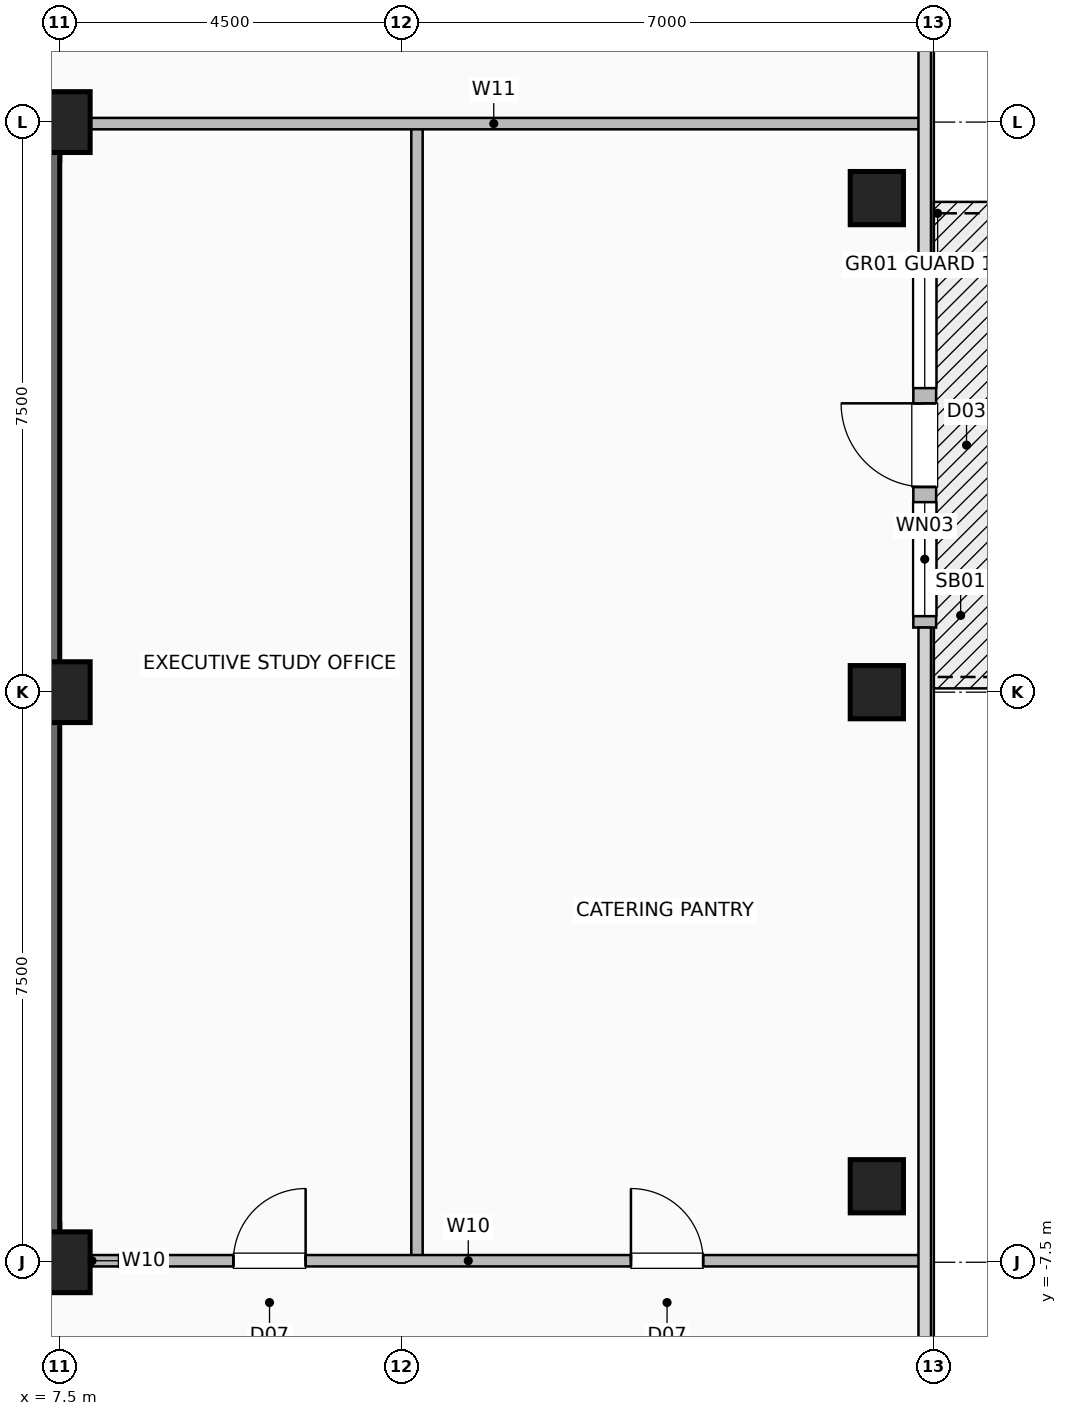
"""IFC4 building model, lengths in metres.
Left out: names, types, materials, properties, quantities, classifications, styles, units other than length and angle.
Written with IfcOpenShell. Run it as: python <this file> out.ifc"""

import sys

from ifc_helpers import new_model, si_unit, direction, frame, frame_2d, origin, origin_2d, place, context, subcontext, project, spatial, rectangle, hollow_rectangle, extrude, element, fill, save


model = new_model("IFC4")
c1 = context("Model", 3, precision=1e-05, world=origin(), true_north=direction((0.0, 1.0)))
c2 = subcontext(c1, "Body", "Model", "MODEL_VIEW")
j1 = project(units=[si_unit("LENGTHUNIT", "METRE"), si_unit("PLANEANGLEUNIT", "RADIAN")], contexts=[c1])
p1 = place(None, origin())
s1 = spatial("IfcSite", under=j1, at=p1, CompositionType="ELEMENT")
p2 = place(p1, origin())
s2 = spatial("IfcBuilding", under=s1, at=p2, CompositionType="ELEMENT")
p3 = place(p2, frame((0.0, 0.0, 243.2)))
s3 = spatial("IfcBuildingStorey", under=s2, at=p3, CompositionType="ELEMENT", Elevation=243.2)
for number, where, z_axis, x_axis in (
    (1, (7.5, -7.5, 0.0), (0.0, 0.0, 1.0), (1.0, 0.0, 0.0)),
    (2, (7.5, 0.0, 0.0), (0.0, 0.0, 1.0), (1.0, 0.0, 0.0)),
    (3, (7.5, 7.5, 0.0), (0.0, 0.0, 1.0), (1.0, 0.0, 0.0)),
):
    element("IfcColumn", number, at=place(p3, frame(where, z_axis=z_axis, x_axis=x_axis)), inside=s3, PredefinedType="COLUMN", context=c2, shape_type="SweptSolid", body=[
        extrude(hollow_rectangle(XDim=0.8, YDim=0.8, WallThickness=0.04, at=origin_2d()), origin(), (0.0, 0.0, 1.0), 3.6),
    ])
for number, where, z_axis, x_axis in (
    (4, (18.25, -6.5, 0.0), (0.0, 0.0, 1.0), (1.0, 0.0, 0.0)),
    (5, (18.25, 0.0, 0.0), (0.0, 0.0, 1.0), (1.0, 0.0, 0.0)),
    (6, (18.25, 6.5, 0.0), (0.0, 0.0, 1.0), (1.0, 0.0, 0.0)),
):
    element("IfcColumn", number, at=place(p3, frame(where, z_axis=z_axis, x_axis=x_axis)), inside=s3, PredefinedType="COLUMN", context=c2, shape_type="SweptSolid", body=[
        extrude(hollow_rectangle(XDim=0.7, YDim=0.7, WallThickness=0.035, at=origin_2d()), origin(), (0.0, 0.0, 1.0), 3.6),
    ])
p4 = place(p3, frame((18.88, 0.85, 0.0), z_axis=(0.0, 0.0, 1.0), x_axis=(0.0, 1.0, 0.0)))
e7 = element("IfcWall", 7, at=p4, inside=s3, PredefinedType="SOLIDWALL", context=c2, shape_type="SweptSolid", body=[
    extrude(rectangle(XDim=4.8, YDim=0.3, at=frame_2d((2.4, 0.0))), origin(), (0.0, 0.0, 1.0), 3.36),
])
p5 = place(p4, frame((1.85, 0.0, 0.0)))
e8 = element("IfcOpeningElement", 8, at=p5, cuts=e7, PredefinedType="OPENING", context=c2, shape_type="SweptSolid", body=[
    extrude(rectangle(XDim=1.1, YDim=2.2, at=frame_2d((0.55, 1.1))), frame((0.0, 0.16, 0.0), z_axis=(0.0, -1.0, 0.0), x_axis=(1.0, 0.0, 0.0)), (0.0, 0.0, 1.0), 0.32),
])
p6 = place(p4, frame((0.15, 0.0, 0.85)))
e9 = element("IfcOpeningElement", 9, at=p6, cuts=e7, PredefinedType="OPENING", context=c2, shape_type="SweptSolid", body=[
    extrude(rectangle(XDim=1.5, YDim=1.8, at=frame_2d((0.75, 0.9))), frame((0.0, 0.16, 0.0), z_axis=(0.0, -1.0, 0.0), x_axis=(1.0, 0.0, 0.0)), (0.0, 0.0, 1.0), 0.32),
])
p7 = place(p4, frame((3.15, 0.0, 0.85)))
e10 = element("IfcOpeningElement", 10, at=p7, cuts=e7, PredefinedType="OPENING", context=c2, shape_type="SweptSolid", body=[
    extrude(rectangle(XDim=1.5, YDim=1.8, at=frame_2d((0.75, 0.9))), frame((0.0, 0.16, 0.0), z_axis=(0.0, -1.0, 0.0), x_axis=(1.0, 0.0, 0.0)), (0.0, 0.0, 1.0), 0.32),
])
p8 = place(p3, frame((-7.5, -7.25, 0.0), z_axis=(0.0, 0.0, 1.0), x_axis=(1.0, 0.0, 0.0)))
e11 = element("IfcWall", 11, at=p8, inside=s3, PredefinedType="SHEAR", context=c2, shape_type="SweptSolid", body=[
    extrude(rectangle(XDim=15.0, YDim=0.5, at=frame_2d((7.5, 0.0))), origin(), (0.0, 0.0, 1.0), 3.36),
])
p9 = place(p8, frame((1.55, 0.0, 0.0)))
e12 = element("IfcOpeningElement", 12, at=p9, cuts=e11, PredefinedType="OPENING", context=c2, shape_type="SweptSolid", body=[
    extrude(rectangle(XDim=1.05, YDim=2.08, at=frame_2d((0.525, 1.04))), frame((0.0, 0.26, 0.0), z_axis=(0.0, -1.0, 0.0), x_axis=(1.0, 0.0, 0.0)), (0.0, 0.0, 1.0), 0.52),
])
p10 = place(p8, frame((12.4, 0.0, 0.0)))
e13 = element("IfcOpeningElement", 13, at=p10, cuts=e11, PredefinedType="OPENING", context=c2, shape_type="SweptSolid", body=[
    extrude(rectangle(XDim=1.05, YDim=2.08, at=frame_2d((0.525, 1.04))), frame((0.0, 0.26, 0.0), z_axis=(0.0, -1.0, 0.0), x_axis=(1.0, 0.0, 0.0)), (0.0, 0.0, 1.0), 0.52),
])
p11 = place(p8, frame((5.2, 0.0, 0.0)))
e14 = element("IfcOpeningElement", 14, at=p11, cuts=e11, PredefinedType="OPENING", context=c2, shape_type="SweptSolid", body=[
    extrude(rectangle(XDim=1.0, YDim=2.08, at=frame_2d((0.5, 1.04))), frame((0.0, 0.26, 0.0), z_axis=(0.0, -1.0, 0.0), x_axis=(1.0, 0.0, 0.0)), (0.0, 0.0, 1.0), 0.52),
])
p12 = place(p8, frame((8.65, 0.0, 0.0)))
e15 = element("IfcOpeningElement", 15, at=p12, cuts=e11, PredefinedType="OPENING", context=c2, shape_type="SweptSolid", body=[
    extrude(rectangle(XDim=1.0, YDim=2.08, at=frame_2d((0.5, 1.04))), frame((0.0, 0.26, 0.0), z_axis=(0.0, -1.0, 0.0), x_axis=(1.0, 0.0, 0.0)), (0.0, 0.0, 1.0), 0.52),
])
for number, where, z_axis, x_axis in (
    (16, (-7.5, 7.25, 0.0), (0.0, 0.0, 1.0), (1.0, 0.0, 0.0)),
    (17, (7.25, -7.5, 0.0), (0.0, 0.0, 1.0), (0.0, 1.0, 0.0)),
):
    element("IfcWall", number, at=place(p3, frame(where, z_axis=z_axis, x_axis=x_axis)), inside=s3, PredefinedType="SHEAR", context=c2, shape_type="SweptSolid", body=[
        extrude(rectangle(XDim=15.0, YDim=0.5, at=frame_2d((7.5, 0.0))), origin(), (0.0, 0.0, 1.0), 3.36),
    ])
p13 = place(p3, frame((7.45, -7.48, 0.0), z_axis=(0.0, 0.0, 1.0), x_axis=(1.0, 0.0, 0.0)))
e18 = element("IfcWall", 18, at=p13, inside=s3, PredefinedType="PARTITIONING", context=c2, shape_type="SweptSolid", body=[
    extrude(rectangle(XDim=0.95, YDim=0.15, at=frame_2d((0.475, 0.0))), origin(), (0.0, 0.0, 1.0), 3.36),
])
p14 = place(p3, frame((12.2, -7.48, 0.0), z_axis=(0.0, 0.0, 1.0), x_axis=(0.0, 1.0, 0.0)))
e19 = element("IfcWall", 19, at=p14, inside=s3, PredefinedType="PARTITIONING", context=c2, shape_type="SweptSolid", body=[
    extrude(rectangle(XDim=14.9, YDim=0.15, at=frame_2d((7.45, 0.0))), origin(), (0.0, 0.0, 1.0), 3.36),
])
p15 = place(p3, frame((8.28, -7.48, 0.0), z_axis=(0.0, 0.0, 1.0), x_axis=(1.0, 0.0, 0.0)))
e20 = element("IfcWall", 20, at=p15, inside=s3, PredefinedType="PARTITIONING", context=c2, shape_type="SweptSolid", body=[
    extrude(rectangle(XDim=10.54, YDim=0.15, at=frame_2d((5.27, 0.0))), origin(), (0.0, 0.0, 1.0), 3.36),
])
p16 = place(p15, frame((1.505, 0.0, 0.0)))
e21 = element("IfcOpeningElement", 21, at=p16, cuts=e20, PredefinedType="OPENING", context=c2, shape_type="SweptSolid", body=[
    extrude(rectangle(XDim=0.95, YDim=2.06, at=frame_2d((0.475, 1.03))), frame((0.0, 0.085, 0.0), z_axis=(0.0, -1.0, 0.0), x_axis=(1.0, 0.0, 0.0)), (0.0, 0.0, 1.0), 0.17),
])
p17 = place(p15, frame((6.735, 0.0, 0.0)))
e22 = element("IfcOpeningElement", 22, at=p17, cuts=e20, PredefinedType="OPENING", context=c2, shape_type="SweptSolid", body=[
    extrude(rectangle(XDim=0.95, YDim=2.06, at=frame_2d((0.475, 1.03))), frame((0.0, 0.085, 0.0), z_axis=(0.0, -1.0, 0.0), x_axis=(1.0, 0.0, 0.0)), (0.0, 0.0, 1.0), 0.17),
])
p18 = place(p3, frame((7.6, 7.48, 0.0), z_axis=(0.0, 0.0, 1.0), x_axis=(1.0, 0.0, 0.0)))
e23 = element("IfcWall", 23, at=p18, inside=s3, PredefinedType="PARTITIONING", context=c2, shape_type="SweptSolid", body=[
    extrude(rectangle(XDim=11.22, YDim=0.15, at=frame_2d((5.61, 0.0))), origin(), (0.0, 0.0, 1.0), 3.36),
])
p19 = place(p5, origin())
e24 = element("IfcDoor", 24, at=p19, inside=s3, OperationType="SINGLE_SWING_RIGHT", PredefinedType="DOOR", context=c2, shape_type="SweptSolid", body=[
    extrude(rectangle(XDim=1.1, YDim=2.2, at=frame_2d((0.55, 1.1))), frame((0.0, 0.025, 0.0), z_axis=(0.0, -1.0, 0.0), x_axis=(1.0, 0.0, 0.0)), (0.0, 0.0, 1.0), 0.05),
])
fill(e8, e24)
p20 = place(p6, origin())
e25 = element("IfcWindow", 25, at=p20, inside=s3, PartitioningType="SINGLE_PANEL", PredefinedType="WINDOW", context=c2, shape_type="SweptSolid", body=[
    extrude(rectangle(XDim=1.5, YDim=1.8, at=frame_2d((0.75, 0.9))), frame((0.0, 0.03, 0.0), z_axis=(0.0, -1.0, 0.0), x_axis=(1.0, 0.0, 0.0)), (0.0, 0.0, 1.0), 0.06),
])
fill(e9, e25)
p21 = place(p7, origin())
e26 = element("IfcWindow", 26, at=p21, inside=s3, PartitioningType="SINGLE_PANEL", PredefinedType="WINDOW", context=c2, shape_type="SweptSolid", body=[
    extrude(rectangle(XDim=1.5, YDim=1.8, at=frame_2d((0.75, 0.9))), frame((0.0, 0.03, 0.0), z_axis=(0.0, -1.0, 0.0), x_axis=(1.0, 0.0, 0.0)), (0.0, 0.0, 1.0), 0.06),
])
fill(e10, e26)
p22 = place(p16, origin())
e27 = element("IfcDoor", 27, at=p22, inside=s3, OperationType="SINGLE_SWING_RIGHT", PredefinedType="DOOR", context=c2, shape_type="SweptSolid", body=[
    extrude(rectangle(XDim=0.95, YDim=2.06, at=frame_2d((0.475, 1.03))), frame((0.0, 0.025, 0.0), z_axis=(0.0, -1.0, 0.0), x_axis=(1.0, 0.0, 0.0)), (0.0, 0.0, 1.0), 0.05),
])
fill(e21, e27)
p23 = place(p17, origin())
e28 = element("IfcDoor", 28, at=p23, inside=s3, OperationType="SINGLE_SWING_LEFT", PredefinedType="DOOR", context=c2, shape_type="SweptSolid", body=[
    extrude(rectangle(XDim=0.95, YDim=2.06, at=frame_2d((0.475, 1.03))), frame((0.0, 0.025, 0.0), z_axis=(0.0, -1.0, 0.0), x_axis=(1.0, 0.0, 0.0)), (0.0, 0.0, 1.0), 0.05),
])
fill(e22, e28)
save(model, sys.argv[1])
